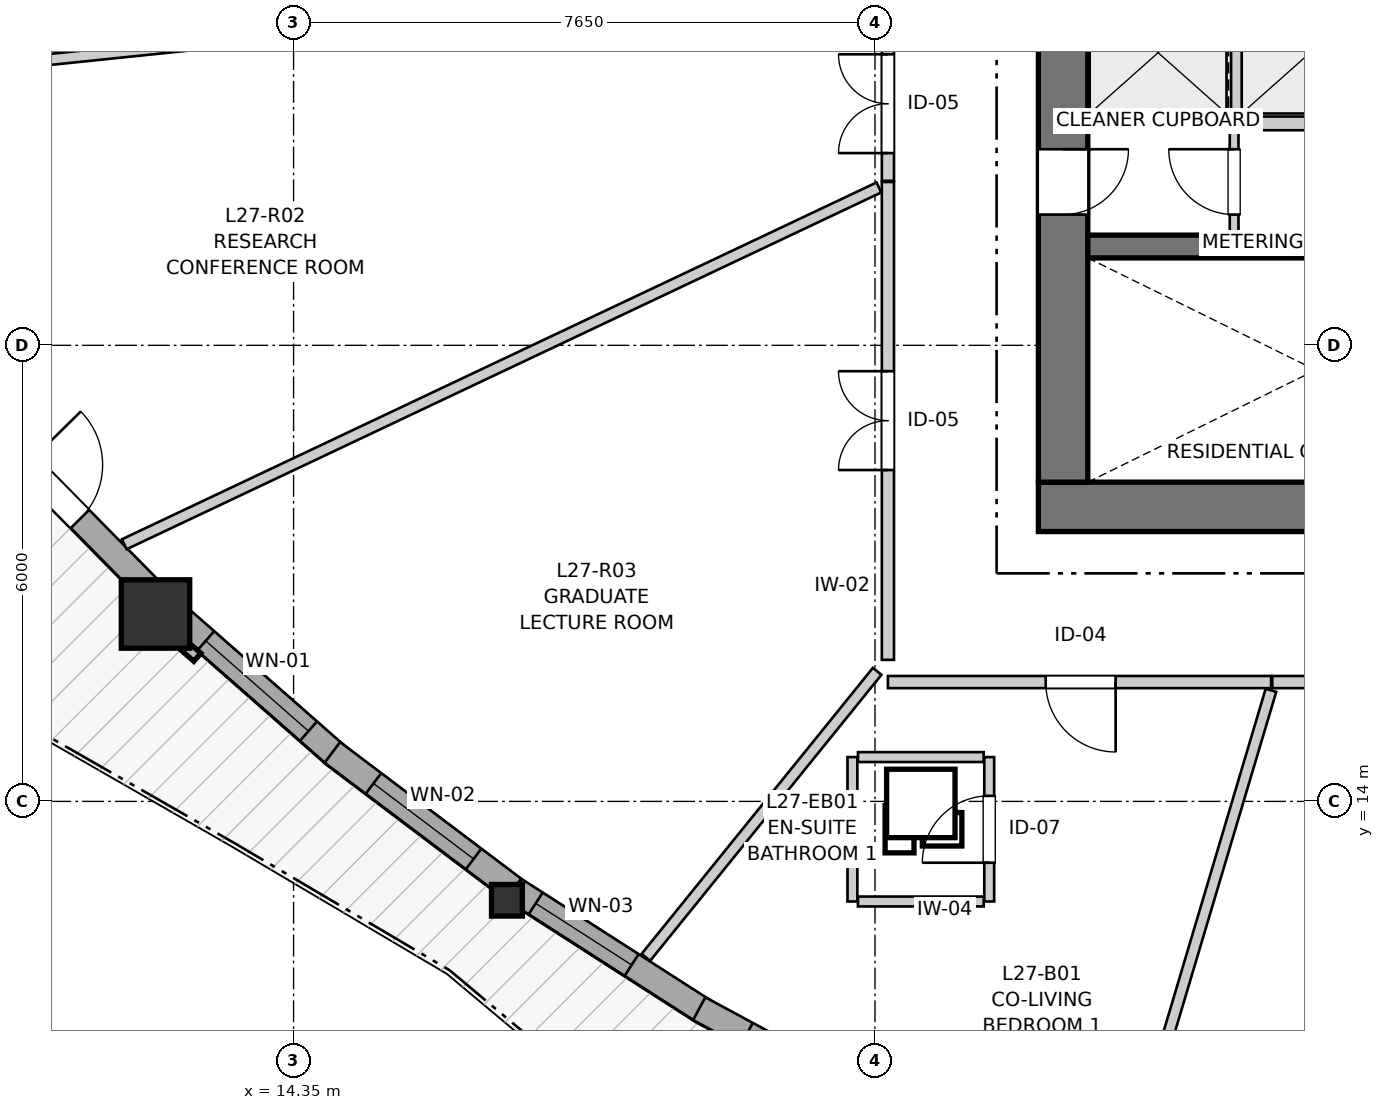
"""IFC4 building model, lengths in metres.
Left out: names, types, materials, properties, quantities, classifications, styles, units other than length and angle.
Written with IfcOpenShell. Run it as: python <this file> out.ifc"""

import sys

from ifc_helpers import new_model, si_unit, direction, frame, frame_2d, origin, origin_2d, place, context, subcontext, project, spatial, rectangle, i_section, extrude, source, transform, mapped, element, fill, save


model = new_model("IFC4")
c1 = context("Model", 3, precision=1e-05, world=origin(), true_north=direction((0.0, 1.0)))
c2 = subcontext(c1, "Body", "Model", "MODEL_VIEW")
j1 = project(units=[si_unit("LENGTHUNIT", "METRE"), si_unit("PLANEANGLEUNIT", "RADIAN")], contexts=[c1])
p1 = place(None, origin())
s1 = spatial("IfcSite", under=j1, at=p1, CompositionType="ELEMENT")
p2 = place(p1, origin())
s2 = spatial("IfcBuilding", under=s1, at=p2, CompositionType="ELEMENT")
p3 = place(p2, frame((0.0, 0.0, 92.8)))
s3 = spatial("IfcBuildingStorey", under=s2, at=p3, CompositionType="ELEMENT", Elevation=92.8)
p4 = place(p3, frame((24.15, 17.875, 0.0), z_axis=(0.0, 0.0, 1.0), x_axis=(1.0, 0.0, 0.0)))
e1 = element("IfcWall", 1, at=p4, inside=s3, PredefinedType="SHEAR", context=c2, shape_type="SweptSolid", body=[
    extrude(rectangle(XDim=12.4, YDim=0.65, at=frame_2d((6.2, 0.0))), origin(), (0.0, 0.0, 1.0), 2.95),
])
p5 = place(p3, frame((24.475, 33.8, 0.0), z_axis=(0.0, 0.0, 1.0), x_axis=(0.0, -1.0, 0.0)))
e2 = element("IfcWall", 2, at=p5, inside=s3, PredefinedType="SHEAR", context=c2, shape_type="SweptSolid", body=[
    extrude(rectangle(XDim=15.6, YDim=0.65, at=frame_2d((7.8, 0.0))), origin(), (0.0, 0.0, 1.0), 2.95),
])
p6 = place(p5, frame((7.05, 0.0, 0.0)))
e3 = element("IfcOpeningElement", 3, at=p6, cuts=e2, PredefinedType="OPENING", context=c2, shape_type="SweptSolid", body=[
    extrude(rectangle(XDim=1.5, YDim=2.15, at=frame_2d((0.75, 1.075))), frame((0.0, 0.335, 0.0), z_axis=(0.0, -1.0, 0.0), x_axis=(1.0, 0.0, 0.0)), (0.0, 0.0, 1.0), 0.67),
])
p7 = place(p5, frame((3.52, 0.0, 0.0)))
e4 = element("IfcOpeningElement", 4, at=p7, cuts=e2, PredefinedType="OPENING", context=c2, shape_type="SweptSolid", body=[
    extrude(rectangle(XDim=0.86, YDim=2.05, at=frame_2d((0.43, 1.025))), frame((0.0, 0.335, 0.0), z_axis=(0.0, -1.0, 0.0), x_axis=(1.0, 0.0, 0.0)), (0.0, 0.0, 1.0), 0.67),
])
p8 = place(p5, frame((11.22, 0.0, 0.0)))
e5 = element("IfcOpeningElement", 5, at=p8, cuts=e2, PredefinedType="OPENING", context=c2, shape_type="SweptSolid", body=[
    extrude(rectangle(XDim=0.86, YDim=2.05, at=frame_2d((0.43, 1.025))), frame((0.0, 0.335, 0.0), z_axis=(0.0, -1.0, 0.0), x_axis=(1.0, 0.0, 0.0)), (0.0, 0.0, 1.0), 0.67),
])
p9 = place(p3, frame((24.8, 21.3, 0.0), z_axis=(0.0, 0.0, 1.0), x_axis=(1.0, 0.0, 0.0)))
e6 = element("IfcWall", 6, at=p9, inside=s3, PredefinedType="SHEAR", context=c2, shape_type="SweptSolid", body=[
    extrude(rectangle(XDim=11.1, YDim=0.3, at=frame_2d((5.55, 0.0))), origin(), (0.0, 0.0, 1.0), 2.95),
])
p10 = place(p9, frame((6.22, 0.0, 0.0)))
e7 = element("IfcOpeningElement", 7, at=p10, cuts=e6, PredefinedType="OPENING", context=c2, shape_type="SweptSolid", body=[
    extrude(rectangle(XDim=0.98, YDim=2.15, at=frame_2d((0.49, 1.075))), frame((0.0, 0.16, 0.0), z_axis=(0.0, -1.0, 0.0), x_axis=(1.0, 0.0, 0.0)), (0.0, 0.0, 1.0), 0.32),
])
p11 = place(p9, frame((9.15, 0.0, 0.0)))
e8 = element("IfcOpeningElement", 8, at=p11, cuts=e6, PredefinedType="OPENING", context=c2, shape_type="SweptSolid", body=[
    extrude(rectangle(XDim=1.15, YDim=2.15, at=frame_2d((0.575, 1.075))), frame((0.0, 0.16, 0.0), z_axis=(0.0, -1.0, 0.0), x_axis=(1.0, 0.0, 0.0)), (0.0, 0.0, 1.0), 0.32),
])
m1 = source(origin(), c2, "Body", "SweptSolid", [
    extrude(rectangle(XDim=0.9, YDim=0.9, at=origin_2d()), origin(), (0.0, 0.0, 1.0), 2.95),
])
p12 = place(p3, frame((12.534, 16.465, 0.0), z_axis=(0.0, 0.0, 1.0), x_axis=(1.0, 0.0, 0.0)))
e9 = element("IfcColumn", 9, at=p12, inside=s3, PredefinedType="COLUMN", context=c2, shape_type="MappedRepresentation", body=[
    mapped(m1, transform((0.0, 0.0, 0.0), x_axis=(1.0, 0.0, 0.0), y_axis=(0.0, 1.0, 0.0), z_axis=(0.0, 0.0, 1.0), scale=1.0)),
])
m2 = source(origin(), c2, "Body", "SweptSolid", [
    extrude(i_section(OverallWidth=0.406, OverallDepth=0.416, WebThickness=0.027, FlangeThickness=0.044, FilletRadius=0.015, at=origin_2d()), origin(), (0.0, 0.0, 1.0), 2.95),
])
p13 = place(p3, frame((17.157, 12.699, 0.0), z_axis=(0.0, 0.0, 1.0), x_axis=(1.0, 0.0, 0.0)))
e10 = element("IfcColumn", 10, at=p13, inside=s3, PredefinedType="PILASTER", context=c2, shape_type="MappedRepresentation", body=[
    mapped(m2, transform((0.0, 0.0, 0.0), x_axis=(1.0, 0.0, 0.0), y_axis=(0.0, 1.0, 0.0), z_axis=(0.0, 0.0, 1.0), scale=1.0)),
])
p14 = place(p3, frame((10.487, 18.784, 0.0), z_axis=(0.0, 0.0, 1.0), x_axis=(0.701920439278, -0.71225535935, 0.0)))
e11 = element("IfcWall", 11, at=p14, inside=s3, PredefinedType="SOLIDWALL", context=c2, shape_type="SweptSolid", body=[
    extrude(rectangle(XDim=2.858, YDim=0.34, at=frame_2d((1.429, 0.0))), origin(), (0.0, 0.0, 1.0), 2.48),
])
p15 = place(p14, frame((0.5, 0.0, 0.0)))
e12 = element("IfcOpeningElement", 12, at=p15, cuts=e11, PredefinedType="OPENING", context=c2, shape_type="SweptSolid", body=[
    extrude(rectangle(XDim=1.0, YDim=2.1, at=frame_2d((0.5, 1.05))), frame((0.0, 0.18, 0.0), z_axis=(0.0, -1.0, 0.0), x_axis=(1.0, 0.0, 0.0)), (0.0, 0.0, 1.0), 0.36),
])
p16 = place(p3, frame((12.819, 16.441, 0.0), z_axis=(0.0, 0.0, 1.0), x_axis=(0.751471759174, -0.659765257621, 0.0)))
e13 = element("IfcWall", 13, at=p16, inside=s3, PredefinedType="SOLIDWALL", context=c2, shape_type="SweptSolid", body=[
    extrude(rectangle(XDim=2.809, YDim=0.34, at=frame_2d((1.404, 0.0))), origin(), (0.0, 0.0, 1.0), 2.48),
])
p17 = place(p16, frame((0.499, 0.0, 0.82)))
e14 = element("IfcOpeningElement", 14, at=p17, cuts=e13, PredefinedType="OPENING", context=c2, shape_type="SweptSolid", body=[
    extrude(rectangle(XDim=1.8, YDim=1.45, at=frame_2d((0.9, 0.725))), frame((0.0, 0.18, 0.0), z_axis=(0.0, -1.0, 0.0), x_axis=(1.0, 0.0, 0.0)), (0.0, 0.0, 1.0), 0.36),
])
p18 = place(p3, frame((14.861, 14.644, 0.0), z_axis=(0.0, 0.0, 1.0), x_axis=(0.798407246828, -0.602117819212, 0.0)))
e15 = element("IfcWall", 15, at=p18, inside=s3, PredefinedType="SOLIDWALL", context=c2, shape_type="SweptSolid", body=[
    extrude(rectangle(XDim=2.985, YDim=0.34, at=frame_2d((1.493, 0.0))), origin(), (0.0, 0.0, 1.0), 2.48),
])
p19 = place(p18, frame((0.677, 0.0, 0.82)))
e16 = element("IfcOpeningElement", 16, at=p19, cuts=e15, PredefinedType="OPENING", context=c2, shape_type="SweptSolid", body=[
    extrude(rectangle(XDim=1.65, YDim=1.45, at=frame_2d((0.825, 0.725))), frame((0.0, 0.18, 0.0), z_axis=(0.0, -1.0, 0.0), x_axis=(1.0, 0.0, 0.0)), (0.0, 0.0, 1.0), 0.36),
])
p20 = place(p3, frame((17.266, 12.832, 0.0), z_axis=(0.0, 0.0, 1.0), x_axis=(0.841493702039, -0.540266924241, 0.0)))
e17 = element("IfcWall", 17, at=p20, inside=s3, PredefinedType="SOLIDWALL", context=c2, shape_type="SweptSolid", body=[
    extrude(rectangle(XDim=2.968, YDim=0.34, at=frame_2d((1.484, 0.0))), origin(), (0.0, 0.0, 1.0), 2.48),
])
p21 = place(p20, frame((0.321, 0.0, 0.82)))
e18 = element("IfcOpeningElement", 18, at=p21, cuts=e17, PredefinedType="OPENING", context=c2, shape_type="SweptSolid", body=[
    extrude(rectangle(XDim=1.5, YDim=1.45, at=frame_2d((0.75, 0.725))), frame((0.0, 0.18, 0.0), z_axis=(0.0, -1.0, 0.0), x_axis=(1.0, 0.0, 0.0)), (0.0, 0.0, 1.0), 0.36),
])
p22 = place(p3, frame((19.687, 11.273, 0.0), z_axis=(0.0, 0.0, 1.0), x_axis=(0.880115534419, -0.474759566595, 0.0)))
e19 = element("IfcWall", 19, at=p22, inside=s3, PredefinedType="SOLIDWALL", context=c2, shape_type="SweptSolid", body=[
    extrude(rectangle(XDim=2.758, YDim=0.34, at=frame_2d((1.379, 0.0))), origin(), (0.0, 0.0, 1.0), 2.48),
])
p23 = place(p22, frame((0.709, 0.0, 0.82)))
e20 = element("IfcOpeningElement", 20, at=p23, cuts=e19, PredefinedType="OPENING", context=c2, shape_type="SweptSolid", body=[
    extrude(rectangle(XDim=1.35, YDim=1.45, at=frame_2d((0.675, 0.725))), frame((0.0, 0.18, 0.0), z_axis=(0.0, -1.0, 0.0), x_axis=(1.0, 0.0, 0.0)), (0.0, 0.0, 1.0), 0.36),
])
p24 = place(p3, frame((24.81, 22.92, 0.0), z_axis=(0.0, 0.0, 1.0), x_axis=(1.0, 0.0, 0.0)))
e21 = element("IfcWall", 21, at=p24, inside=s3, PredefinedType="PARTITIONING", context=c2, shape_type="SweptSolid", body=[
    extrude(rectangle(XDim=5.84, YDim=0.18, at=frame_2d((2.92, 0.0))), origin(), (0.0, 0.0, 1.0), 2.95),
])
p25 = place(p3, frame((26.775, 23.02, 0.0), z_axis=(0.0, 0.0, 1.0), x_axis=(0.0, 1.0, 0.0)))
e22 = element("IfcWall", 22, at=p25, inside=s3, PredefinedType="PARTITIONING", context=c2, shape_type="SweptSolid", body=[
    extrude(rectangle(XDim=1.78, YDim=0.18, at=frame_2d((0.89, 0.0))), origin(), (0.0, 0.0, 1.0), 2.95),
])
p26 = place(p3, frame((26.725, 21.46, 0.0), z_axis=(0.0, 0.0, 1.0), x_axis=(0.0, 1.0, 0.0)))
e23 = element("IfcWall", 23, at=p26, inside=s3, PredefinedType="PARTITIONING", context=c2, shape_type="SweptSolid", body=[
    extrude(rectangle(XDim=1.38, YDim=0.115, at=frame_2d((0.69, 0.0))), origin(), (0.0, 0.0, 1.0), 2.95),
])
p27 = place(p26, frame((0.26, 0.0, 0.0)))
e24 = element("IfcOpeningElement", 24, at=p27, cuts=e23, PredefinedType="OPENING", context=c2, shape_type="SweptSolid", body=[
    extrude(rectangle(XDim=0.86, YDim=2.05, at=frame_2d((0.43, 1.025))), frame((0.0, 0.067, 0.0), z_axis=(0.0, -1.0, 0.0), x_axis=(1.0, 0.0, 0.0)), (0.0, 0.0, 1.0), 0.135),
])
p28 = place(p3, frame((22.17, 15.862, 0.0), z_axis=(0.0, 0.0, 1.0), x_axis=(0.0, 1.0, 0.0)))
e25 = element("IfcWall", 25, at=p28, inside=s3, PredefinedType="PARTITIONING", context=c2, shape_type="SweptSolid", body=[
    extrude(rectangle(XDim=6.287, YDim=0.16, at=frame_2d((3.144, 0.0))), origin(), (0.0, 0.0, 1.0), 2.95),
])
p29 = place(p28, frame((2.498, 0.0, 0.0)))
e26 = element("IfcOpeningElement", 26, at=p29, cuts=e25, PredefinedType="OPENING", context=c2, shape_type="SweptSolid", body=[
    extrude(rectangle(XDim=1.3, YDim=2.1, at=frame_2d((0.65, 1.05))), frame((0.0, 0.09, 0.0), z_axis=(0.0, -1.0, 0.0), x_axis=(1.0, 0.0, 0.0)), (0.0, 0.0, 1.0), 0.18),
])
p30 = place(p3, frame((32.848, 15.57, 0.0), z_axis=(0.0, 0.0, 1.0), x_axis=(-1.0, 0.0, 0.0)))
e27 = element("IfcWall", 27, at=p30, inside=s3, PredefinedType="PARTITIONING", context=c2, shape_type="SweptSolid", body=[
    extrude(rectangle(XDim=5.621, YDim=0.16, at=frame_2d((2.811, 0.0))), origin(), (0.0, 0.0, 1.0), 2.95),
])
p31 = place(p30, frame((2.16, 0.0, 0.0)))
e28 = element("IfcOpeningElement", 28, at=p31, cuts=e27, PredefinedType="OPENING", context=c2, shape_type="SweptSolid", body=[
    extrude(rectangle(XDim=1.3, YDim=2.1, at=frame_2d((0.65, 1.05))), frame((0.0, 0.09, 0.0), z_axis=(0.0, -1.0, 0.0), x_axis=(1.0, 0.0, 0.0)), (0.0, 0.0, 1.0), 0.18),
])
p32 = place(p3, frame((27.212, 15.57, 0.0), z_axis=(0.0, 0.0, 1.0), x_axis=(-1.0, 0.0, 0.0)))
e29 = element("IfcWall", 29, at=p32, inside=s3, PredefinedType="PARTITIONING", context=c2, shape_type="SweptSolid", body=[
    extrude(rectangle(XDim=5.042, YDim=0.16, at=frame_2d((2.521, 0.0))), origin(), (0.0, 0.0, 1.0), 2.95),
])
p33 = place(p32, frame((2.046, 0.0, 0.0)))
e30 = element("IfcOpeningElement", 30, at=p33, cuts=e29, PredefinedType="OPENING", context=c2, shape_type="SweptSolid", body=[
    extrude(rectangle(XDim=0.92, YDim=2.1, at=frame_2d((0.46, 1.05))), frame((0.0, 0.09, 0.0), z_axis=(0.0, -1.0, 0.0), x_axis=(1.0, 0.0, 0.0)), (0.0, 0.0, 1.0), 0.18),
])
p34 = place(p3, frame((22.17, 22.164, 0.0), z_axis=(0.0, 0.0, 1.0), x_axis=(0.0, 1.0, 0.0)))
e31 = element("IfcWall", 31, at=p34, inside=s3, PredefinedType="PARTITIONING", context=c2, shape_type="SweptSolid", body=[
    extrude(rectangle(XDim=1.986, YDim=0.16, at=frame_2d((0.993, 0.0))), origin(), (0.0, 0.0, 1.0), 2.95),
])
p35 = place(p34, frame((0.365, 0.0, 0.0)))
e32 = element("IfcOpeningElement", 32, at=p35, cuts=e31, PredefinedType="OPENING", context=c2, shape_type="SweptSolid", body=[
    extrude(rectangle(XDim=1.3, YDim=2.1, at=frame_2d((0.65, 1.05))), frame((0.0, 0.09, 0.0), z_axis=(0.0, -1.0, 0.0), x_axis=(1.0, 0.0, 0.0)), (0.0, 0.0, 1.0), 0.18),
])
p36 = place(p3, frame((23.503, 12.683, 0.0), z_axis=(0.0, 0.0, 1.0), x_axis=(0.0, 1.0, 0.0)))
e33 = element("IfcWall", 33, at=p36, inside=s3, PredefinedType="PARTITIONING", context=c2, shape_type="SweptSolid", body=[
    extrude(rectangle(XDim=1.9, YDim=0.13, at=frame_2d((0.95, 0.0))), origin(), (0.0, 0.0, 1.0), 2.95),
])
p37 = place(p36, frame((0.51, 0.0, 0.0)))
e34 = element("IfcOpeningElement", 34, at=p37, cuts=e33, PredefinedType="OPENING", context=c2, shape_type="SweptSolid", body=[
    extrude(rectangle(XDim=0.88, YDim=2.05, at=frame_2d((0.44, 1.025))), frame((0.0, 0.075, 0.0), z_axis=(0.0, -1.0, 0.0), x_axis=(1.0, 0.0, 0.0)), (0.0, 0.0, 1.0), 0.15),
])
p38 = place(p3, frame((12.123, 17.383, 0.0), z_axis=(0.0, 0.0, 1.0), x_axis=(0.904049465168, 0.427427847162, 0.0)))
e35 = element("IfcWall", 35, at=p38, inside=s3, PredefinedType="PARTITIONING", context=c2, shape_type="SweptSolid", body=[
    extrude(rectangle(XDim=10.983, YDim=0.145, at=frame_2d((5.491, 0.0))), origin(), (0.0, 0.0, 1.0), 2.95),
])
p39 = place(p3, frame((6.678, 23.299, 0.0), z_axis=(0.0, 0.0, 1.0), x_axis=(0.994682199009, 0.102991858774, 0.0)))
e36 = element("IfcWall", 36, at=p39, inside=s3, PredefinedType="PARTITIONING", context=c2, shape_type="SweptSolid", body=[
    extrude(rectangle(XDim=8.266, YDim=0.145, at=frame_2d((4.133, 0.0))), origin(), (0.0, 0.0, 1.0), 2.95),
])
p40 = place(p3, frame((25.217, 8.774, 0.0), z_axis=(0.0, 0.0, 1.0), x_axis=(0.28553060174, 0.958369592313, 0.0)))
e37 = element("IfcWall", 37, at=p40, inside=s3, PredefinedType="PARTITIONING", context=c2, shape_type="SweptSolid", body=[
    extrude(rectangle(XDim=6.978, YDim=0.145, at=frame_2d((3.489, 0.0))), origin(), (0.0, 0.0, 1.0), 2.95),
])
p41 = place(p3, frame((18.986, 11.948, 0.0), z_axis=(0.0, 0.0, 1.0), x_axis=(0.628820808954, 0.777550249326, 0.0)))
e38 = element("IfcWall", 38, at=p41, inside=s3, PredefinedType="PARTITIONING", context=c2, shape_type="SweptSolid", body=[
    extrude(rectangle(XDim=4.839, YDim=0.145, at=frame_2d((2.419, 0.0))), origin(), (0.0, 0.0, 1.0), 2.95),
])
p42 = place(p3, frame((21.703, 12.683, 0.0), z_axis=(0.0, 0.0, 1.0), x_axis=(0.0, 1.0, 0.0)))
e39 = element("IfcWall", 39, at=p42, inside=s3, PredefinedType="PARTITIONING", context=c2, shape_type="SweptSolid", body=[
    extrude(rectangle(XDim=1.9, YDim=0.13, at=frame_2d((0.95, 0.0))), origin(), (0.0, 0.0, 1.0), 2.95),
])
for number, where, z_axis, x_axis in (
    (40, (21.776, 14.583, 0.0), (0.0, 0.0, 1.0), (1.0, 0.0, 0.0)),
    (41, (21.776, 12.683, 0.0), (0.0, 0.0, 1.0), (1.0, 0.0, 0.0)),
):
    element("IfcWall", number, at=place(p3, frame(where, z_axis=z_axis, x_axis=x_axis)), inside=s3, PredefinedType="PARTITIONING", context=c2, shape_type="SweptSolid", body=[
        extrude(rectangle(XDim=1.654, YDim=0.13, at=frame_2d((0.827, 0.0))), origin(), (0.0, 0.0, 1.0), 2.95),
    ])
m3 = source(origin(), c2, "Body", "SweptSolid", [
    extrude(rectangle(XDim=1.8, YDim=1.45, at=frame_2d((0.9, 0.725))), frame((0.0, 0.03, 0.0), z_axis=(0.0, -1.0, 0.0), x_axis=(1.0, 0.0, 0.0)), (0.0, 0.0, 1.0), 0.06),
])
p43 = place(p17, origin())
e42 = element("IfcWindow", 42, at=p43, inside=s3, PartitioningType="SINGLE_PANEL", PredefinedType="WINDOW", context=c2, shape_type="MappedRepresentation", body=[
    mapped(m3, transform((0.0, 0.0, 0.0), x_axis=(1.0, 0.0, 0.0), y_axis=(0.0, 1.0, 0.0), z_axis=(0.0, 0.0, 1.0), scale=1.0)),
])
fill(e14, e42)
m4 = source(origin(), c2, "Body", "SweptSolid", [
    extrude(rectangle(XDim=1.65, YDim=1.45, at=frame_2d((0.825, 0.725))), frame((0.0, 0.03, 0.0), z_axis=(0.0, -1.0, 0.0), x_axis=(1.0, 0.0, 0.0)), (0.0, 0.0, 1.0), 0.06),
])
p44 = place(p19, origin())
e43 = element("IfcWindow", 43, at=p44, inside=s3, PartitioningType="SINGLE_PANEL", PredefinedType="WINDOW", context=c2, shape_type="MappedRepresentation", body=[
    mapped(m4, transform((0.0, 0.0, 0.0), x_axis=(1.0, 0.0, 0.0), y_axis=(0.0, 1.0, 0.0), z_axis=(0.0, 0.0, 1.0), scale=1.0)),
])
fill(e16, e43)
m5 = source(origin(), c2, "Body", "SweptSolid", [
    extrude(rectangle(XDim=1.5, YDim=1.45, at=frame_2d((0.75, 0.725))), frame((0.0, 0.03, 0.0), z_axis=(0.0, -1.0, 0.0), x_axis=(1.0, 0.0, 0.0)), (0.0, 0.0, 1.0), 0.06),
])
p45 = place(p21, origin())
e44 = element("IfcWindow", 44, at=p45, inside=s3, PartitioningType="SINGLE_PANEL", PredefinedType="WINDOW", context=c2, shape_type="MappedRepresentation", body=[
    mapped(m5, transform((0.0, 0.0, 0.0), x_axis=(1.0, 0.0, 0.0), y_axis=(0.0, 1.0, 0.0), z_axis=(0.0, 0.0, 1.0), scale=1.0)),
])
fill(e18, e44)
m6 = source(origin(), c2, "Body", "SweptSolid", [
    extrude(rectangle(XDim=1.0, YDim=2.1, at=frame_2d((0.5, 1.05))), frame((0.0, 0.025, 0.0), z_axis=(0.0, -1.0, 0.0), x_axis=(1.0, 0.0, 0.0)), (0.0, 0.0, 1.0), 0.05),
])
p46 = place(p15, origin())
e45 = element("IfcDoor", 45, at=p46, inside=s3, OperationType="SINGLE_SWING_LEFT", PredefinedType="DOOR", context=c2, shape_type="MappedRepresentation", body=[
    mapped(m6, transform((0.0, 0.0, 0.0), x_axis=(1.0, 0.0, 0.0), y_axis=(0.0, 1.0, 0.0), z_axis=(0.0, 0.0, 1.0), scale=1.0)),
])
fill(e12, e45)
m7 = source(origin(), c2, "Body", "SweptSolid", [
    extrude(rectangle(XDim=0.86, YDim=2.05, at=frame_2d((0.43, 1.025))), frame((0.0, 0.025, 0.0), z_axis=(0.0, -1.0, 0.0), x_axis=(1.0, 0.0, 0.0)), (0.0, 0.0, 1.0), 0.05),
])
p47 = place(p8, origin())
e46 = element("IfcDoor", 46, at=p47, inside=s3, OperationType="SINGLE_SWING_LEFT", PredefinedType="DOOR", context=c2, shape_type="MappedRepresentation", body=[
    mapped(m7, transform((0.0, 0.0, 0.0), x_axis=(1.0, 0.0, 0.0), y_axis=(0.0, 1.0, 0.0), z_axis=(0.0, 0.0, 1.0), scale=1.0)),
])
fill(e5, e46)
p48 = place(p27, origin())
e47 = element("IfcDoor", 47, at=p48, inside=s3, OperationType="SINGLE_SWING_RIGHT", PredefinedType="DOOR", context=c2, shape_type="MappedRepresentation", body=[
    mapped(m7, transform((0.0, 0.0, 0.0), x_axis=(1.0, 0.0, 0.0), y_axis=(0.0, 1.0, 0.0), z_axis=(0.0, 0.0, 1.0), scale=1.0)),
])
fill(e24, e47)
m8 = source(origin(), c2, "Body", "SweptSolid", [
    extrude(rectangle(XDim=1.3, YDim=2.1, at=frame_2d((0.65, 1.05))), frame((0.0, 0.025, 0.0), z_axis=(0.0, -1.0, 0.0), x_axis=(1.0, 0.0, 0.0)), (0.0, 0.0, 1.0), 0.05),
])
p49 = place(p29, origin())
e48 = element("IfcDoor", 48, at=p49, inside=s3, OperationType="DOUBLE_DOOR_SINGLE_SWING", PredefinedType="DOOR", context=c2, shape_type="MappedRepresentation", body=[
    mapped(m8, transform((0.0, 0.0, 0.0), x_axis=(1.0, 0.0, 0.0), y_axis=(0.0, 1.0, 0.0), z_axis=(0.0, 0.0, 1.0), scale=1.0)),
])
fill(e26, e48)
m9 = source(origin(), c2, "Body", "SweptSolid", [
    extrude(rectangle(XDim=0.92, YDim=2.1, at=frame_2d((0.46, 1.05))), frame((0.0, 0.025, 0.0), z_axis=(0.0, -1.0, 0.0), x_axis=(1.0, 0.0, 0.0)), (0.0, 0.0, 1.0), 0.05),
])
p50 = place(p33, origin())
e49 = element("IfcDoor", 49, at=p50, inside=s3, OperationType="SINGLE_SWING_LEFT", PredefinedType="DOOR", context=c2, shape_type="MappedRepresentation", body=[
    mapped(m9, transform((0.0, 0.0, 0.0), x_axis=(1.0, 0.0, 0.0), y_axis=(0.0, 1.0, 0.0), z_axis=(0.0, 0.0, 1.0), scale=1.0)),
])
fill(e30, e49)
p51 = place(p35, origin())
e50 = element("IfcDoor", 50, at=p51, inside=s3, OperationType="DOUBLE_DOOR_SINGLE_SWING", PredefinedType="DOOR", context=c2, shape_type="MappedRepresentation", body=[
    mapped(m8, transform((0.0, 0.0, 0.0), x_axis=(1.0, 0.0, 0.0), y_axis=(0.0, 1.0, 0.0), z_axis=(0.0, 0.0, 1.0), scale=1.0)),
])
fill(e32, e50)
m10 = source(origin(), c2, "Body", "SweptSolid", [
    extrude(rectangle(XDim=0.88, YDim=2.05, at=frame_2d((0.44, 1.025))), frame((0.0, 0.025, 0.0), z_axis=(0.0, -1.0, 0.0), x_axis=(1.0, 0.0, 0.0)), (0.0, 0.0, 1.0), 0.05),
])
p52 = place(p37, origin())
e51 = element("IfcDoor", 51, at=p52, inside=s3, OperationType="SINGLE_SWING_LEFT", PredefinedType="DOOR", context=c2, shape_type="MappedRepresentation", body=[
    mapped(m10, transform((0.0, 0.0, 0.0), x_axis=(1.0, 0.0, 0.0), y_axis=(0.0, 1.0, 0.0), z_axis=(0.0, 0.0, 1.0), scale=1.0)),
])
fill(e34, e51)
save(model, sys.argv[1])
